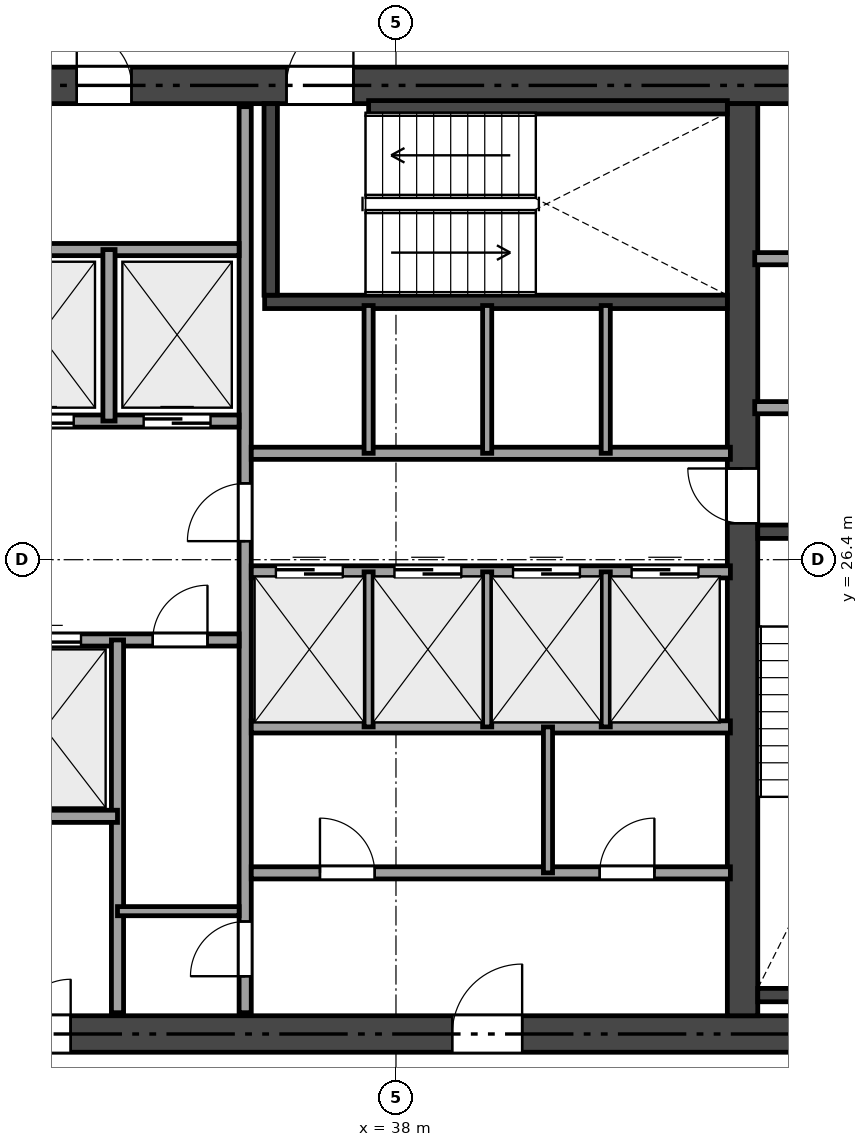
"""IFC4 building model, lengths in metres.
Left out: names, types, materials, properties, quantities, classifications, styles, units other than length and angle.
Written with IfcOpenShell. Run it as: python <this file> out.ifc"""

import sys

from ifc_helpers import new_model, si_unit, direction, frame, frame_2d, origin, place, context, subcontext, project, spatial, rectangle, extrude, element, fill, save


model = new_model("IFC4")
c1 = context("Model", 3, precision=1e-05, world=origin(), true_north=direction((0.0, 1.0)))
c2 = subcontext(c1, "Body", "Model", "MODEL_VIEW")
j1 = project(units=[si_unit("LENGTHUNIT", "METRE"), si_unit("PLANEANGLEUNIT", "RADIAN")], contexts=[c1])
p1 = place(None, origin())
s1 = spatial("IfcSite", under=j1, at=p1, CompositionType="ELEMENT")
p2 = place(p1, origin())
s2 = spatial("IfcBuilding", under=s1, at=p2, CompositionType="ELEMENT")
p3 = place(p2, frame((0.0, 0.0, 168.9)))
s3 = spatial("IfcBuildingStorey", under=s2, at=p3, CompositionType="ELEMENT", Elevation=168.9)
p4 = place(p3, frame((26.5, 18.6, 0.0), z_axis=(0.0, 0.0, 1.0), x_axis=(1.0, 0.0, 0.0)))
e1 = element("IfcWall", 1, at=p4, inside=s3, PredefinedType="SHEAR", context=c2, shape_type="SweptSolid", body=[
    extrude(rectangle(XDim=21.4, YDim=0.6, at=frame_2d((10.7, 0.0))), origin(), (0.0, 0.0, 1.0), 3.24),
])
p5 = place(p4, frame((12.425, 0.0, 0.0)))
e2 = element("IfcOpeningElement", 2, at=p5, cuts=e1, PredefinedType="OPENING", context=c2, shape_type="SweptSolid", body=[
    extrude(rectangle(XDim=1.15, YDim=2.15, at=frame_2d((0.575, 1.075))), frame((0.0, 0.31, 0.0), z_axis=(0.0, -1.0, 0.0), x_axis=(1.0, 0.0, 0.0)), (0.0, 0.0, 1.0), 0.62),
])
p6 = place(p4, frame((5.25, 0.0, 0.0)))
e3 = element("IfcOpeningElement", 3, at=p6, cuts=e1, PredefinedType="OPENING", context=c2, shape_type="SweptSolid", body=[
    extrude(rectangle(XDim=0.9, YDim=2.1, at=frame_2d((0.45, 1.05))), frame((0.0, 0.31, 0.0), z_axis=(0.0, -1.0, 0.0), x_axis=(1.0, 0.0, 0.0)), (0.0, 0.0, 1.0), 0.62),
])
p7 = place(p3, frame((26.5, 34.2, 0.0), z_axis=(0.0, 0.0, 1.0), x_axis=(1.0, 0.0, 0.0)))
e4 = element("IfcWall", 4, at=p7, inside=s3, PredefinedType="SHEAR", context=c2, shape_type="SweptSolid", body=[
    extrude(rectangle(XDim=21.4, YDim=0.6, at=frame_2d((10.7, 0.0))), origin(), (0.0, 0.0, 1.0), 3.24),
])
p8 = place(p7, frame((9.7, 0.0, 0.0)))
e5 = element("IfcOpeningElement", 5, at=p8, cuts=e4, PredefinedType="OPENING", context=c2, shape_type="SweptSolid", body=[
    extrude(rectangle(XDim=1.1, YDim=2.15, at=frame_2d((0.55, 1.075))), frame((0.0, 0.31, 0.0), z_axis=(0.0, -1.0, 0.0), x_axis=(1.0, 0.0, 0.0)), (0.0, 0.0, 1.0), 0.62),
])
p9 = place(p7, frame((1.95, 0.0, 0.0)))
e6 = element("IfcOpeningElement", 6, at=p9, cuts=e4, PredefinedType="OPENING", context=c2, shape_type="SweptSolid", body=[
    extrude(rectangle(XDim=0.9, YDim=2.1, at=frame_2d((0.45, 1.05))), frame((0.0, 0.31, 0.0), z_axis=(0.0, -1.0, 0.0), x_axis=(1.0, 0.0, 0.0)), (0.0, 0.0, 1.0), 0.62),
])
p10 = place(p7, frame((6.25, 0.0, 0.0)))
e7 = element("IfcOpeningElement", 7, at=p10, cuts=e4, PredefinedType="OPENING", context=c2, shape_type="SweptSolid", body=[
    extrude(rectangle(XDim=0.9, YDim=2.1, at=frame_2d((0.45, 1.05))), frame((0.0, 0.31, 0.0), z_axis=(0.0, -1.0, 0.0), x_axis=(1.0, 0.0, 0.0)), (0.0, 0.0, 1.0), 0.62),
])
p11 = place(p3, frame((43.7, 18.9, 0.0), z_axis=(0.0, 0.0, 1.0), x_axis=(0.0, 1.0, 0.0)))
e8 = element("IfcWall", 8, at=p11, inside=s3, PredefinedType="SHEAR", context=c2, shape_type="SweptSolid", body=[
    extrude(rectangle(XDim=15.0, YDim=0.5, at=frame_2d((7.5, 0.0))), origin(), (0.0, 0.0, 1.0), 3.24),
])
p12 = place(p11, frame((8.1, 0.0, 0.0)))
e9 = element("IfcOpeningElement", 9, at=p12, cuts=e8, PredefinedType="OPENING", context=c2, shape_type="SweptSolid", body=[
    extrude(rectangle(XDim=0.9, YDim=2.1, at=frame_2d((0.45, 1.05))), frame((0.0, 0.26, 0.0), z_axis=(0.0, -1.0, 0.0), x_axis=(1.0, 0.0, 0.0)), (0.0, 0.0, 1.0), 0.52),
])
for number, where, z_axis, x_axis in (
    (10, (43.95, 26.86, 0.0), (0.0, 0.0, 1.0), (1.0, 0.0, 0.0)),
    (11, (43.95, 19.24, 0.0), (0.0, 0.0, 1.0), (1.0, 0.0, 0.0)),
):
    element("IfcWall", number, at=place(p3, frame(where, z_axis=z_axis, x_axis=x_axis)), inside=s3, PredefinedType="SHEAR", context=c2, shape_type="SweptSolid", body=[
        extrude(rectangle(XDim=3.35, YDim=0.22, at=frame_2d((1.675, 0.0))), origin(), (0.0, 0.0, 1.0), 3.24),
    ])
p13 = place(p3, frame((35.84, 30.64, 0.0), z_axis=(0.0, 0.0, 1.0), x_axis=(1.0, 0.0, 0.0)))
e12 = element("IfcWall", 12, at=p13, inside=s3, PredefinedType="SHEAR", context=c2, shape_type="SweptSolid", body=[
    extrude(rectangle(XDim=7.61, YDim=0.22, at=frame_2d((3.805, 0.0))), origin(), (0.0, 0.0, 1.0), 3.24),
])
p14 = place(p3, frame((35.94, 30.75, 0.0), z_axis=(0.0, 0.0, 1.0), x_axis=(0.0, 1.0, 0.0)))
e13 = element("IfcWall", 13, at=p14, inside=s3, PredefinedType="SHEAR", context=c2, shape_type="SweptSolid", body=[
    extrude(rectangle(XDim=3.15, YDim=0.22, at=frame_2d((1.575, 0.0))), origin(), (0.0, 0.0, 1.0), 3.24),
])
p15 = place(p3, frame((37.55, 33.84, 0.0), z_axis=(0.0, 0.0, 1.0), x_axis=(1.0, 0.0, 0.0)))
e14 = element("IfcWall", 14, at=p15, inside=s3, PredefinedType="SHEAR", context=c2, shape_type="SweptSolid", body=[
    extrude(rectangle(XDim=5.9, YDim=0.22, at=frame_2d((2.95, 0.0))), origin(), (0.0, 0.0, 1.0), 3.24),
])
p16 = place(p3, frame((43.9, 28.9, 0.0), z_axis=(0.0, 0.0, 1.0), x_axis=(1.0, 0.0, 0.0)))
e15 = element("IfcWall", 15, at=p16, inside=s3, PredefinedType="SOLIDWALL", context=c2, shape_type="SweptSolid", body=[
    extrude(rectangle(XDim=3.35, YDim=0.2, at=frame_2d((1.675, 0.0))), origin(), (0.0, 0.0, 1.0), 3.24),
])
p17 = place(p16, frame((1.15, 0.0, 0.0)))
e16 = element("IfcOpeningElement", 16, at=p17, cuts=e15, PredefinedType="OPENING", context=c2, shape_type="SweptSolid", body=[
    extrude(rectangle(XDim=0.9, YDim=2.1, at=frame_2d((0.45, 1.05))), frame((0.0, 0.11, 0.0), z_axis=(0.0, -1.0, 0.0), x_axis=(1.0, 0.0, 0.0)), (0.0, 0.0, 1.0), 0.22),
])
p18 = place(p3, frame((43.9, 31.35, 0.0), z_axis=(0.0, 0.0, 1.0), x_axis=(1.0, 0.0, 0.0)))
e17 = element("IfcWall", 17, at=p18, inside=s3, PredefinedType="SOLIDWALL", context=c2, shape_type="SweptSolid", body=[
    extrude(rectangle(XDim=3.35, YDim=0.2, at=frame_2d((1.675, 0.0))), origin(), (0.0, 0.0, 1.0), 3.24),
])
p19 = place(p3, frame((35.52, 18.95, 0.0), z_axis=(0.0, 0.0, 1.0), x_axis=(0.0, 1.0, 0.0)))
e18 = element("IfcWall", 18, at=p19, inside=s3, PredefinedType="SOLIDWALL", context=c2, shape_type="SweptSolid", body=[
    extrude(rectangle(XDim=14.9, YDim=0.2, at=frame_2d((7.45, 0.0))), origin(), (0.0, 0.0, 1.0), 2.761),
])
p20 = place(p19, frame((7.755, 0.0, 0.0)))
e19 = element("IfcOpeningElement", 19, at=p20, cuts=e18, PredefinedType="OPENING", context=c2, shape_type="SweptSolid", body=[
    extrude(rectangle(XDim=0.95, YDim=2.15, at=frame_2d((0.475, 1.075))), frame((0.0, 0.11, 0.0), z_axis=(0.0, -1.0, 0.0), x_axis=(1.0, 0.0, 0.0)), (0.0, 0.0, 1.0), 0.22),
])
p21 = place(p19, frame((0.6, 0.0, 0.0)))
e20 = element("IfcOpeningElement", 20, at=p21, cuts=e18, PredefinedType="OPENING", context=c2, shape_type="SweptSolid", body=[
    extrude(rectangle(XDim=0.9, YDim=2.1, at=frame_2d((0.45, 1.05))), frame((0.0, 0.11, 0.0), z_axis=(0.0, -1.0, 0.0), x_axis=(1.0, 0.0, 0.0)), (0.0, 0.0, 1.0), 0.22),
])
p22 = place(p3, frame((31.0, 28.68, 0.0), z_axis=(0.0, 0.0, 1.0), x_axis=(1.0, 0.0, 0.0)))
e21 = element("IfcWall", 21, at=p22, inside=s3, PredefinedType="SOLIDWALL", context=c2, shape_type="SweptSolid", body=[
    extrude(rectangle(XDim=4.42, YDim=0.2, at=frame_2d((2.21, 0.0))), origin(), (0.0, 0.0, 1.0), 3.24),
])
p23 = place(p22, frame((0.6, 0.0, 0.0)))
e22 = element("IfcOpeningElement", 22, at=p23, cuts=e21, PredefinedType="OPENING", context=c2, shape_type="SweptSolid", body=[
    extrude(rectangle(XDim=1.1, YDim=2.15, at=frame_2d((0.55, 1.075))), frame((0.0, 0.11, 0.0), z_axis=(0.0, -1.0, 0.0), x_axis=(1.0, 0.0, 0.0)), (0.0, 0.0, 1.0), 0.22),
])
p24 = place(p22, frame((2.85, 0.0, 0.0)))
e23 = element("IfcOpeningElement", 23, at=p24, cuts=e21, PredefinedType="OPENING", context=c2, shape_type="SweptSolid", body=[
    extrude(rectangle(XDim=1.1, YDim=2.15, at=frame_2d((0.55, 1.075))), frame((0.0, 0.11, 0.0), z_axis=(0.0, -1.0, 0.0), x_axis=(1.0, 0.0, 0.0)), (0.0, 0.0, 1.0), 0.22),
])
p25 = place(p3, frame((31.0, 31.5, 0.0), z_axis=(0.0, 0.0, 1.0), x_axis=(1.0, 0.0, 0.0)))
e24 = element("IfcWall", 24, at=p25, inside=s3, PredefinedType="SOLIDWALL", context=c2, shape_type="SweptSolid", body=[
    extrude(rectangle(XDim=4.42, YDim=0.2, at=frame_2d((2.21, 0.0))), origin(), (0.0, 0.0, 1.0), 3.24),
])
p26 = place(p3, frame((33.28, 28.68, 0.0), z_axis=(0.0, 0.0, 1.0), x_axis=(0.0, 1.0, 0.0)))
e25 = element("IfcWall", 25, at=p26, inside=s3, PredefinedType="SOLIDWALL", context=c2, shape_type="SweptSolid", body=[
    extrude(rectangle(XDim=2.82, YDim=0.2, at=frame_2d((1.41, 0.0))), origin(), (0.0, 0.0, 1.0), 3.24),
])
p27 = place(p3, frame((31.0, 25.08, 0.0), z_axis=(0.0, 0.0, 1.0), x_axis=(1.0, 0.0, 0.0)))
e26 = element("IfcWall", 26, at=p27, inside=s3, PredefinedType="SOLIDWALL", context=c2, shape_type="SweptSolid", body=[
    extrude(rectangle(XDim=4.42, YDim=0.2, at=frame_2d((2.21, 0.0))), origin(), (0.0, 0.0, 1.0), 3.24),
])
p28 = place(p27, frame((3.0, 0.0, 0.0)))
e27 = element("IfcOpeningElement", 27, at=p28, cuts=e26, PredefinedType="OPENING", context=c2, shape_type="SweptSolid", body=[
    extrude(rectangle(XDim=0.9, YDim=2.1, at=frame_2d((0.45, 1.05))), frame((0.0, 0.11, 0.0), z_axis=(0.0, -1.0, 0.0), x_axis=(1.0, 0.0, 0.0)), (0.0, 0.0, 1.0), 0.22),
])
p29 = place(p27, frame((0.62, 0.0, 0.0)))
e28 = element("IfcOpeningElement", 28, at=p29, cuts=e26, PredefinedType="OPENING", context=c2, shape_type="SweptSolid", body=[
    extrude(rectangle(XDim=1.2, YDim=2.15, at=frame_2d((0.6, 1.075))), frame((0.0, 0.11, 0.0), z_axis=(0.0, -1.0, 0.0), x_axis=(1.0, 0.0, 0.0)), (0.0, 0.0, 1.0), 0.22),
])
p30 = place(p3, frame((33.42, 18.95, 0.0), z_axis=(0.0, 0.0, 1.0), x_axis=(0.0, 1.0, 0.0)))
e29 = element("IfcWall", 29, at=p30, inside=s3, PredefinedType="SOLIDWALL", context=c2, shape_type="SweptSolid", body=[
    extrude(rectangle(XDim=6.13, YDim=0.2, at=frame_2d((3.065, 0.0))), origin(), (0.0, 0.0, 1.0), 2.761),
])
p31 = place(p3, frame((31.0, 22.18, 0.0), z_axis=(0.0, 0.0, 1.0), x_axis=(1.0, 0.0, 0.0)))
e30 = element("IfcWall", 30, at=p31, inside=s3, PredefinedType="SOLIDWALL", context=c2, shape_type="SweptSolid", body=[
    extrude(rectangle(XDim=2.42, YDim=0.2, at=frame_2d((1.21, 0.0))), origin(), (0.0, 0.0, 1.0), 3.24),
])
p32 = place(p3, frame((33.42, 20.62, 0.0), z_axis=(0.0, 0.0, 1.0), x_axis=(1.0, 0.0, 0.0)))
e31 = element("IfcWall", 31, at=p32, inside=s3, PredefinedType="PARTITIONING", context=c2, shape_type="SweptSolid", body=[
    extrude(rectangle(XDim=2.0, YDim=0.15, at=frame_2d((1.0, 0.0))), origin(), (0.0, 0.0, 1.0), 3.24),
])
p33 = place(p3, frame((35.62, 28.15, 0.0), z_axis=(0.0, 0.0, 1.0), x_axis=(1.0, 0.0, 0.0)))
e32 = element("IfcWall", 32, at=p33, inside=s3, PredefinedType="SOLIDWALL", context=c2, shape_type="SweptSolid", body=[
    extrude(rectangle(XDim=7.88, YDim=0.2, at=frame_2d((3.94, 0.0))), origin(), (0.0, 0.0, 1.0), 3.24),
])
p34 = place(p3, frame((35.62, 26.2, 0.0), z_axis=(0.0, 0.0, 1.0), x_axis=(1.0, 0.0, 0.0)))
e33 = element("IfcWall", 33, at=p34, inside=s3, PredefinedType="SOLIDWALL", context=c2, shape_type="SweptSolid", body=[
    extrude(rectangle(XDim=7.88, YDim=0.2, at=frame_2d((3.94, 0.0))), origin(), (0.0, 0.0, 1.0), 3.24),
])
p35 = place(p34, frame((0.405, 0.0, 0.0)))
e34 = element("IfcOpeningElement", 34, at=p35, cuts=e33, PredefinedType="OPENING", context=c2, shape_type="SweptSolid", body=[
    extrude(rectangle(XDim=1.1, YDim=2.15, at=frame_2d((0.55, 1.075))), frame((0.0, 0.11, 0.0), z_axis=(0.0, -1.0, 0.0), x_axis=(1.0, 0.0, 0.0)), (0.0, 0.0, 1.0), 0.22),
])
p36 = place(p34, frame((2.355, 0.0, 0.0)))
e35 = element("IfcOpeningElement", 35, at=p36, cuts=e33, PredefinedType="OPENING", context=c2, shape_type="SweptSolid", body=[
    extrude(rectangle(XDim=1.1, YDim=2.15, at=frame_2d((0.55, 1.075))), frame((0.0, 0.11, 0.0), z_axis=(0.0, -1.0, 0.0), x_axis=(1.0, 0.0, 0.0)), (0.0, 0.0, 1.0), 0.22),
])
p37 = place(p34, frame((4.305, 0.0, 0.0)))
e36 = element("IfcOpeningElement", 36, at=p37, cuts=e33, PredefinedType="OPENING", context=c2, shape_type="SweptSolid", body=[
    extrude(rectangle(XDim=1.1, YDim=2.15, at=frame_2d((0.55, 1.075))), frame((0.0, 0.11, 0.0), z_axis=(0.0, -1.0, 0.0), x_axis=(1.0, 0.0, 0.0)), (0.0, 0.0, 1.0), 0.22),
])
p38 = place(p34, frame((6.255, 0.0, 0.0)))
e37 = element("IfcOpeningElement", 37, at=p38, cuts=e33, PredefinedType="OPENING", context=c2, shape_type="SweptSolid", body=[
    extrude(rectangle(XDim=1.1, YDim=2.15, at=frame_2d((0.55, 1.075))), frame((0.0, 0.11, 0.0), z_axis=(0.0, -1.0, 0.0), x_axis=(1.0, 0.0, 0.0)), (0.0, 0.0, 1.0), 0.22),
])
p39 = place(p3, frame((35.62, 23.65, 0.0), z_axis=(0.0, 0.0, 1.0), x_axis=(1.0, 0.0, 0.0)))
e38 = element("IfcWall", 38, at=p39, inside=s3, PredefinedType="SOLIDWALL", context=c2, shape_type="SweptSolid", body=[
    extrude(rectangle(XDim=7.88, YDim=0.2, at=frame_2d((3.94, 0.0))), origin(), (0.0, 0.0, 1.0), 2.761),
])
p40 = place(p3, frame((35.62, 21.25, 0.0), z_axis=(0.0, 0.0, 1.0), x_axis=(1.0, 0.0, 0.0)))
e39 = element("IfcWall", 39, at=p40, inside=s3, PredefinedType="SOLIDWALL", context=c2, shape_type="SweptSolid", body=[
    extrude(rectangle(XDim=7.88, YDim=0.2, at=frame_2d((3.94, 0.0))), origin(), (0.0, 0.0, 1.0), 3.24),
])
p41 = place(p40, frame((1.13, 0.0, 0.0)))
e40 = element("IfcOpeningElement", 40, at=p41, cuts=e39, PredefinedType="OPENING", context=c2, shape_type="SweptSolid", body=[
    extrude(rectangle(XDim=0.9, YDim=2.1, at=frame_2d((0.45, 1.05))), frame((0.0, 0.11, 0.0), z_axis=(0.0, -1.0, 0.0), x_axis=(1.0, 0.0, 0.0)), (0.0, 0.0, 1.0), 0.22),
])
p42 = place(p40, frame((5.73, 0.0, 0.0)))
e41 = element("IfcOpeningElement", 41, at=p42, cuts=e39, PredefinedType="OPENING", context=c2, shape_type="SweptSolid", body=[
    extrude(rectangle(XDim=0.9, YDim=2.1, at=frame_2d((0.45, 1.05))), frame((0.0, 0.11, 0.0), z_axis=(0.0, -1.0, 0.0), x_axis=(1.0, 0.0, 0.0)), (0.0, 0.0, 1.0), 0.22),
])
for number, where, z_axis, x_axis in (
    (42, (37.55, 28.15, 0.0), (0.0, 0.0, 1.0), (0.0, 1.0, 0.0)),
    (43, (39.5, 28.15, 0.0), (0.0, 0.0, 1.0), (0.0, 1.0, 0.0)),
    (44, (41.45, 28.15, 0.0), (0.0, 0.0, 1.0), (0.0, 1.0, 0.0)),
):
    element("IfcWall", number, at=place(p3, frame(where, z_axis=z_axis, x_axis=x_axis)), inside=s3, PredefinedType="PARTITIONING", context=c2, shape_type="SweptSolid", body=[
        extrude(rectangle(XDim=2.43, YDim=0.15, at=frame_2d((1.215, 0.0))), origin(), (0.0, 0.0, 1.0), 3.24),
    ])
for number, where, z_axis, x_axis in (
    (45, (37.55, 23.65, 0.0), (0.0, 0.0, 1.0), (0.0, 1.0, 0.0)),
    (46, (39.5, 23.65, 0.0), (0.0, 0.0, 1.0), (0.0, 1.0, 0.0)),
    (47, (41.45, 23.65, 0.0), (0.0, 0.0, 1.0), (0.0, 1.0, 0.0)),
):
    element("IfcWall", number, at=place(p3, frame(where, z_axis=z_axis, x_axis=x_axis)), inside=s3, PredefinedType="PARTITIONING", context=c2, shape_type="SweptSolid", body=[
        extrude(rectangle(XDim=2.55, YDim=0.15, at=frame_2d((1.275, 0.0))), origin(), (0.0, 0.0, 1.0), 2.761),
    ])
p43 = place(p3, frame((40.5, 21.25, 0.0), z_axis=(0.0, 0.0, 1.0), x_axis=(0.0, 1.0, 0.0)))
e48 = element("IfcWall", 48, at=p43, inside=s3, PredefinedType="PARTITIONING", context=c2, shape_type="SweptSolid", body=[
    extrude(rectangle(XDim=2.4, YDim=0.15, at=frame_2d((1.2, 0.0))), origin(), (0.0, 0.0, 1.0), 2.761),
])
p44 = place(p8, origin())
e49 = element("IfcDoor", 49, at=p44, inside=s3, OperationType="SINGLE_SWING_RIGHT", PredefinedType="DOOR", context=c2, shape_type="SweptSolid", body=[
    extrude(rectangle(XDim=1.1, YDim=2.15, at=frame_2d((0.55, 1.075))), frame((0.0, 0.025, 0.0), z_axis=(0.0, -1.0, 0.0), x_axis=(1.0, 0.0, 0.0)), (0.0, 0.0, 1.0), 0.05),
])
fill(e5, e49)
p45 = place(p20, origin())
e50 = element("IfcDoor", 50, at=p45, inside=s3, OperationType="SINGLE_SWING_LEFT", PredefinedType="DOOR", context=c2, shape_type="SweptSolid", body=[
    extrude(rectangle(XDim=0.95, YDim=2.15, at=frame_2d((0.475, 1.075))), frame((0.0, 0.025, 0.0), z_axis=(0.0, -1.0, 0.0), x_axis=(1.0, 0.0, 0.0)), (0.0, 0.0, 1.0), 0.05),
])
fill(e19, e50)
p46 = place(p12, origin())
e51 = element("IfcDoor", 51, at=p46, inside=s3, OperationType="SINGLE_SWING_RIGHT", PredefinedType="DOOR", context=c2, shape_type="SweptSolid", body=[
    extrude(rectangle(XDim=0.9, YDim=2.1, at=frame_2d((0.45, 1.05))), frame((0.0, 0.025, 0.0), z_axis=(0.0, -1.0, 0.0), x_axis=(1.0, 0.0, 0.0)), (0.0, 0.0, 1.0), 0.05),
])
fill(e9, e51)
p47 = place(p5, origin())
e52 = element("IfcDoor", 52, at=p47, inside=s3, OperationType="SINGLE_SWING_RIGHT", PredefinedType="DOOR", context=c2, shape_type="SweptSolid", body=[
    extrude(rectangle(XDim=1.15, YDim=2.15, at=frame_2d((0.575, 1.075))), frame((0.0, 0.025, 0.0), z_axis=(0.0, -1.0, 0.0), x_axis=(1.0, 0.0, 0.0)), (0.0, 0.0, 1.0), 0.05),
])
fill(e2, e52)
p48 = place(p10, origin())
e53 = element("IfcDoor", 53, at=p48, inside=s3, OperationType="SINGLE_SWING_LEFT", PredefinedType="DOOR", context=c2, shape_type="SweptSolid", body=[
    extrude(rectangle(XDim=0.9, YDim=2.1, at=frame_2d((0.45, 1.05))), frame((0.0, 0.025, 0.0), z_axis=(0.0, -1.0, 0.0), x_axis=(1.0, 0.0, 0.0)), (0.0, 0.0, 1.0), 0.05),
])
fill(e7, e53)
p49 = place(p6, origin())
e54 = element("IfcDoor", 54, at=p49, inside=s3, OperationType="SINGLE_SWING_RIGHT", PredefinedType="DOOR", context=c2, shape_type="SweptSolid", body=[
    extrude(rectangle(XDim=0.9, YDim=2.1, at=frame_2d((0.45, 1.05))), frame((0.0, 0.025, 0.0), z_axis=(0.0, -1.0, 0.0), x_axis=(1.0, 0.0, 0.0)), (0.0, 0.0, 1.0), 0.05),
])
fill(e3, e54)
p50 = place(p21, origin())
e55 = element("IfcDoor", 55, at=p50, inside=s3, OperationType="SINGLE_SWING_LEFT", PredefinedType="DOOR", context=c2, shape_type="SweptSolid", body=[
    extrude(rectangle(XDim=0.9, YDim=2.1, at=frame_2d((0.45, 1.05))), frame((0.0, 0.025, 0.0), z_axis=(0.0, -1.0, 0.0), x_axis=(1.0, 0.0, 0.0)), (0.0, 0.0, 1.0), 0.05),
])
fill(e20, e55)
p51 = place(p28, origin())
e56 = element("IfcDoor", 56, at=p51, inside=s3, OperationType="SINGLE_SWING_RIGHT", PredefinedType="DOOR", context=c2, shape_type="SweptSolid", body=[
    extrude(rectangle(XDim=0.9, YDim=2.1, at=frame_2d((0.45, 1.05))), frame((0.0, 0.025, 0.0), z_axis=(0.0, -1.0, 0.0), x_axis=(1.0, 0.0, 0.0)), (0.0, 0.0, 1.0), 0.05),
])
fill(e27, e56)
p52 = place(p41, origin())
e57 = element("IfcDoor", 57, at=p52, inside=s3, OperationType="SINGLE_SWING_LEFT", PredefinedType="DOOR", context=c2, shape_type="SweptSolid", body=[
    extrude(rectangle(XDim=0.9, YDim=2.1, at=frame_2d((0.45, 1.05))), frame((0.0, 0.025, 0.0), z_axis=(0.0, -1.0, 0.0), x_axis=(1.0, 0.0, 0.0)), (0.0, 0.0, 1.0), 0.05),
])
fill(e40, e57)
p53 = place(p42, origin())
e58 = element("IfcDoor", 58, at=p53, inside=s3, OperationType="SINGLE_SWING_RIGHT", PredefinedType="DOOR", context=c2, shape_type="SweptSolid", body=[
    extrude(rectangle(XDim=0.9, YDim=2.1, at=frame_2d((0.45, 1.05))), frame((0.0, 0.025, 0.0), z_axis=(0.0, -1.0, 0.0), x_axis=(1.0, 0.0, 0.0)), (0.0, 0.0, 1.0), 0.05),
])
fill(e41, e58)
p54 = place(p23, origin())
e59 = element("IfcDoor", 59, at=p54, inside=s3, OperationType="SLIDING_TO_LEFT", PredefinedType="DOOR", context=c2, shape_type="SweptSolid", body=[
    extrude(rectangle(XDim=1.1, YDim=2.15, at=frame_2d((0.55, 1.075))), frame((0.0, 0.025, 0.0), z_axis=(0.0, -1.0, 0.0), x_axis=(1.0, 0.0, 0.0)), (0.0, 0.0, 1.0), 0.05),
])
fill(e22, e59)
p55 = place(p24, origin())
e60 = element("IfcDoor", 60, at=p55, inside=s3, OperationType="SLIDING_TO_LEFT", PredefinedType="DOOR", context=c2, shape_type="SweptSolid", body=[
    extrude(rectangle(XDim=1.1, YDim=2.15, at=frame_2d((0.55, 1.075))), frame((0.0, 0.025, 0.0), z_axis=(0.0, -1.0, 0.0), x_axis=(1.0, 0.0, 0.0)), (0.0, 0.0, 1.0), 0.05),
])
fill(e23, e60)
p56 = place(p29, origin())
e61 = element("IfcDoor", 61, at=p56, inside=s3, OperationType="SLIDING_TO_LEFT", PredefinedType="DOOR", context=c2, shape_type="SweptSolid", body=[
    extrude(rectangle(XDim=1.2, YDim=2.15, at=frame_2d((0.6, 1.075))), frame((0.0, 0.025, 0.0), z_axis=(0.0, -1.0, 0.0), x_axis=(1.0, 0.0, 0.0)), (0.0, 0.0, 1.0), 0.05),
])
fill(e28, e61)
p57 = place(p35, origin())
e62 = element("IfcDoor", 62, at=p57, inside=s3, OperationType="SLIDING_TO_LEFT", PredefinedType="DOOR", context=c2, shape_type="SweptSolid", body=[
    extrude(rectangle(XDim=1.1, YDim=2.15, at=frame_2d((0.55, 1.075))), frame((0.0, 0.025, 0.0), z_axis=(0.0, -1.0, 0.0), x_axis=(1.0, 0.0, 0.0)), (0.0, 0.0, 1.0), 0.05),
])
fill(e34, e62)
p58 = place(p36, origin())
e63 = element("IfcDoor", 63, at=p58, inside=s3, OperationType="SLIDING_TO_LEFT", PredefinedType="DOOR", context=c2, shape_type="SweptSolid", body=[
    extrude(rectangle(XDim=1.1, YDim=2.15, at=frame_2d((0.55, 1.075))), frame((0.0, 0.025, 0.0), z_axis=(0.0, -1.0, 0.0), x_axis=(1.0, 0.0, 0.0)), (0.0, 0.0, 1.0), 0.05),
])
fill(e35, e63)
p59 = place(p37, origin())
e64 = element("IfcDoor", 64, at=p59, inside=s3, OperationType="SLIDING_TO_LEFT", PredefinedType="DOOR", context=c2, shape_type="SweptSolid", body=[
    extrude(rectangle(XDim=1.1, YDim=2.15, at=frame_2d((0.55, 1.075))), frame((0.0, 0.025, 0.0), z_axis=(0.0, -1.0, 0.0), x_axis=(1.0, 0.0, 0.0)), (0.0, 0.0, 1.0), 0.05),
])
fill(e36, e64)
p60 = place(p38, origin())
e65 = element("IfcDoor", 65, at=p60, inside=s3, OperationType="SLIDING_TO_LEFT", PredefinedType="DOOR", context=c2, shape_type="SweptSolid", body=[
    extrude(rectangle(XDim=1.1, YDim=2.15, at=frame_2d((0.55, 1.075))), frame((0.0, 0.025, 0.0), z_axis=(0.0, -1.0, 0.0), x_axis=(1.0, 0.0, 0.0)), (0.0, 0.0, 1.0), 0.05),
])
fill(e37, e65)
save(model, sys.argv[1])
